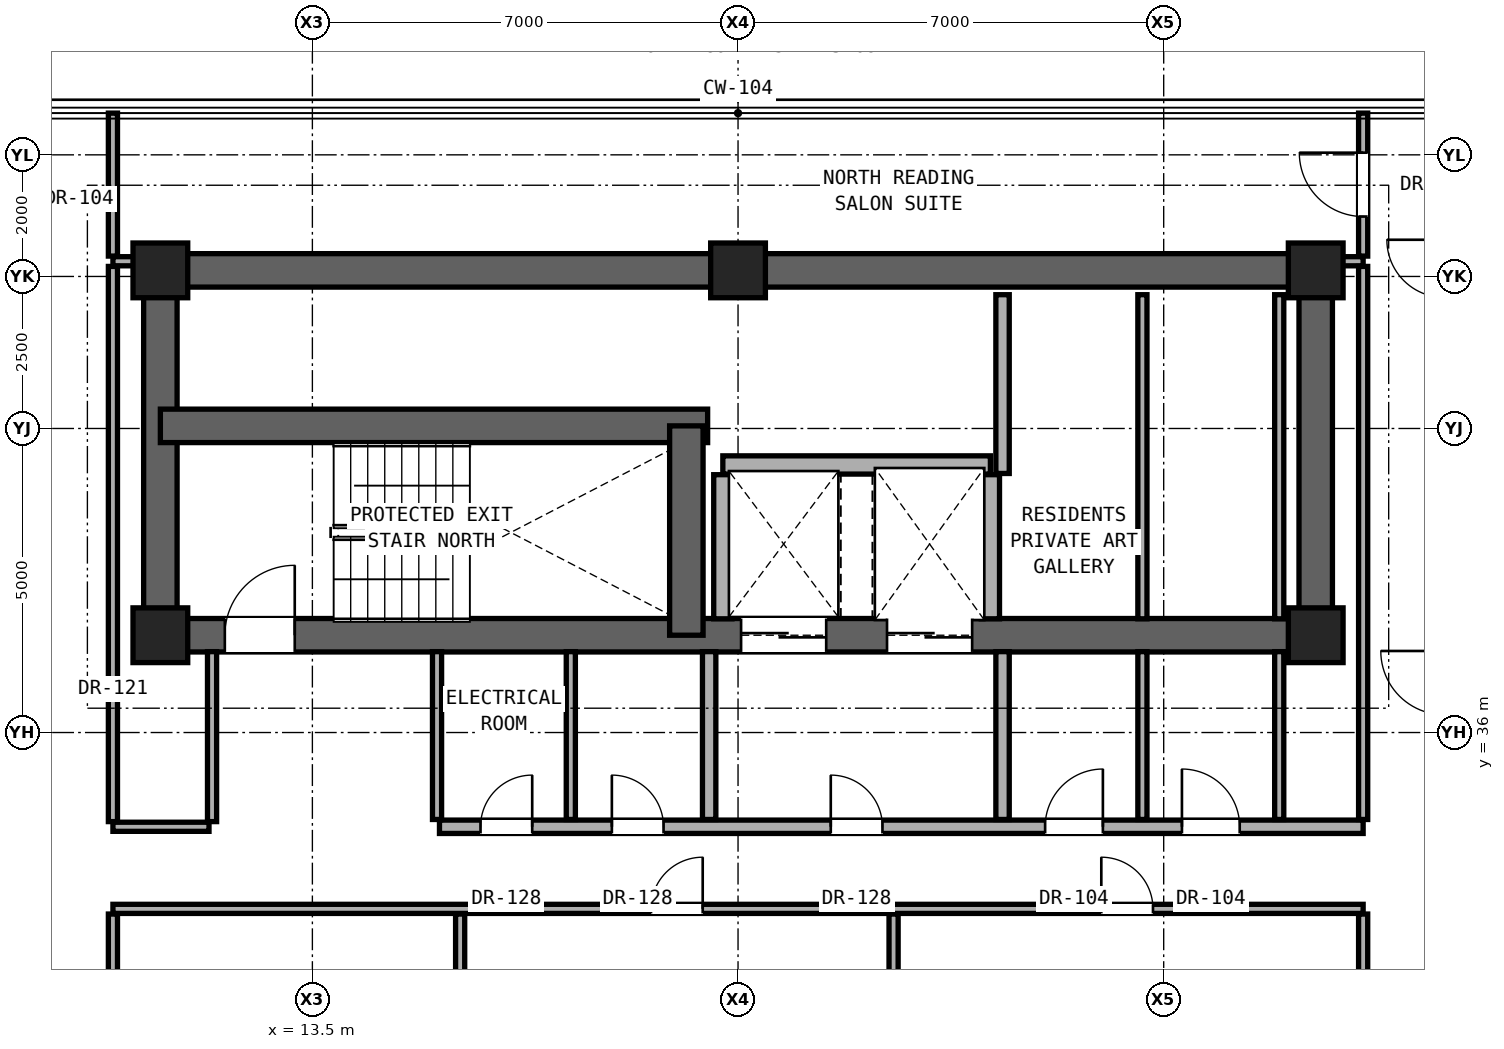
"""IFC4 building model, lengths in metres.
Left out: names, types, materials, properties, quantities, classifications, styles, units other than length and angle.
Written with IfcOpenShell. Run it as: python <this file> out.ifc"""

import sys

from ifc_helpers import new_model, si_unit, direction, frame, frame_2d, origin, origin_2d, place, context, subcontext, project, spatial, rectangle, extrude, element, fill, save


model = new_model("IFC4")
c1 = context("Model", 3, precision=1e-05, world=origin(), true_north=direction((0.0, 1.0)))
c2 = subcontext(c1, "Body", "Model", "MODEL_VIEW")
j1 = project(units=[si_unit("LENGTHUNIT", "METRE"), si_unit("PLANEANGLEUNIT", "RADIAN")], contexts=[c1])
p1 = place(None, origin())
s1 = spatial("IfcSite", under=j1, at=p1, CompositionType="ELEMENT")
p2 = place(p1, origin())
s2 = spatial("IfcBuilding", under=s1, at=p2, CompositionType="ELEMENT")
p3 = place(p2, frame((0.0, 0.0, 190.15)))
s3 = spatial("IfcBuildingStorey", under=s2, at=p3, CompositionType="ELEMENT", Elevation=190.15)
for number, where, z_axis, x_axis in (
    (1, (11.0, 37.6, 0.0), (0.0, 0.0, 1.0), (1.0, 0.0, 0.0)),
    (2, (30.0, 37.6, 0.0), (0.0, 0.0, 1.0), (1.0, 0.0, 0.0)),
    (3, (11.0, 43.6, 0.0), (0.0, 0.0, 1.0), (1.0, 0.0, 0.0)),
    (4, (20.5, 43.6, 0.0), (0.0, 0.0, 1.0), (1.0, 0.0, 0.0)),
    (5, (30.0, 43.6, 0.0), (0.0, 0.0, 1.0), (1.0, 0.0, 0.0)),
):
    element("IfcColumn", number, at=place(p3, frame(where, z_axis=z_axis, x_axis=x_axis)), inside=s3, PredefinedType="COLUMN", context=c2, shape_type="SweptSolid", body=[
        extrude(rectangle(XDim=0.9, YDim=0.9, at=origin_2d()), origin(), (0.0, 0.0, 1.0), 3.25),
    ])
p4 = place(p3, frame((11.0, 43.6, 0.0), z_axis=(0.0, 0.0, 1.0), x_axis=(1.0, 0.0, 0.0)))
e6 = element("IfcWall", 6, at=p4, inside=s3, PredefinedType="SHEAR", context=c2, shape_type="SweptSolid", body=[
    extrude(rectangle(XDim=19.0, YDim=0.55, at=frame_2d((9.5, 0.0))), origin(), (0.0, 0.0, 1.0), 3.05),
])
for number, where, z_axis, x_axis in (
    (7, (11.0, 37.6, 0.0), (0.0, 0.0, 1.0), (0.0, 1.0, 0.0)),
    (8, (30.0, 37.6, 0.0), (0.0, 0.0, 1.0), (0.0, 1.0, 0.0)),
):
    element("IfcWall", number, at=place(p3, frame(where, z_axis=z_axis, x_axis=x_axis)), inside=s3, PredefinedType="SHEAR", context=c2, shape_type="SweptSolid", body=[
        extrude(rectangle(XDim=6.0, YDim=0.55, at=frame_2d((3.0, 0.0))), origin(), (0.0, 0.0, 1.0), 3.05),
    ])
p5 = place(p3, frame((11.0, 37.6, 0.0), z_axis=(0.0, 0.0, 1.0), x_axis=(1.0, 0.0, 0.0)))
e9 = element("IfcWall", 9, at=p5, inside=s3, PredefinedType="SHEAR", context=c2, shape_type="SweptSolid", body=[
    extrude(rectangle(XDim=19.0, YDim=0.55, at=frame_2d((9.5, 0.0))), origin(), (0.0, 0.0, 1.0), 3.05),
])
p6 = place(p5, frame((1.06, 0.0, 0.0)))
e10 = element("IfcOpeningElement", 10, at=p6, cuts=e9, PredefinedType="OPENING", context=c2, shape_type="SweptSolid", body=[
    extrude(rectangle(XDim=1.15, YDim=2.2, at=frame_2d((0.575, 1.1))), frame((0.0, 0.285, 0.0), z_axis=(0.0, -1.0, 0.0), x_axis=(1.0, 0.0, 0.0)), (0.0, 0.0, 1.0), 0.57),
])
p7 = place(p5, frame((9.55, 0.0, 0.0)))
e11 = element("IfcOpeningElement", 11, at=p7, cuts=e9, PredefinedType="OPENING", context=c2, shape_type="SweptSolid", body=[
    extrude(rectangle(XDim=1.4, YDim=2.35, at=frame_2d((0.7, 1.175))), frame((0.0, 0.285, 0.0), z_axis=(0.0, -1.0, 0.0), x_axis=(1.0, 0.0, 0.0)), (0.0, 0.0, 1.0), 0.57),
])
p8 = place(p5, frame((11.95, 0.0, 0.0)))
e12 = element("IfcOpeningElement", 12, at=p8, cuts=e9, PredefinedType="OPENING", context=c2, shape_type="SweptSolid", body=[
    extrude(rectangle(XDim=1.4, YDim=2.35, at=frame_2d((0.7, 1.175))), frame((0.0, 0.285, 0.0), z_axis=(0.0, -1.0, 0.0), x_axis=(1.0, 0.0, 0.0)), (0.0, 0.0, 1.0), 0.57),
])
p9 = place(p3, frame((11.0, 41.043, 0.0), z_axis=(0.0, 0.0, 1.0), x_axis=(1.0, 0.0, 0.0)))
e13 = element("IfcWall", 13, at=p9, inside=s3, PredefinedType="SHEAR", context=c2, shape_type="SweptSolid", body=[
    extrude(rectangle(XDim=9.0, YDim=0.55, at=frame_2d((4.5, 0.0))), origin(), (0.0, 0.0, 1.0), 3.05),
])
p10 = place(p3, frame((19.65, 37.6, 0.0), z_axis=(0.0, 0.0, 1.0), x_axis=(0.0, 1.0, 0.0)))
e14 = element("IfcWall", 14, at=p10, inside=s3, PredefinedType="SHEAR", context=c2, shape_type="SweptSolid", body=[
    extrude(rectangle(XDim=3.443, YDim=0.55, at=frame_2d((1.721, 0.0))), origin(), (0.0, 0.0, 1.0), 3.05),
])
p11 = place(p3, frame((10.22, 33.1, 0.0), z_axis=(0.0, 0.0, 1.0), x_axis=(1.0, 0.0, 0.0)))
e15 = element("IfcWall", 15, at=p11, inside=s3, PredefinedType="PARTITIONING", context=c2, shape_type="SweptSolid", body=[
    extrude(rectangle(XDim=20.56, YDim=0.15, at=frame_2d((10.28, 0.0))), origin(), (0.0, 0.0, 1.0), 2.186),
])
p12 = place(p11, frame((8.849, 0.0, 0.0)))
e16 = element("IfcOpeningElement", 16, at=p12, cuts=e15, PredefinedType="OPENING", context=c2, shape_type="SweptSolid", body=[
    extrude(rectangle(XDim=0.85, YDim=2.01, at=frame_2d((0.425, 1.005))), frame((0.0, 0.085, 0.0), z_axis=(0.0, -1.0, 0.0), x_axis=(1.0, 0.0, 0.0)), (0.0, 0.0, 1.0), 0.17),
])
p13 = place(p11, frame((16.254, 0.0, 0.0)))
e17 = element("IfcOpeningElement", 17, at=p13, cuts=e15, PredefinedType="OPENING", context=c2, shape_type="SweptSolid", body=[
    extrude(rectangle(XDim=0.85, YDim=2.01, at=frame_2d((0.425, 1.005))), frame((0.0, 0.085, 0.0), z_axis=(0.0, -1.0, 0.0), x_axis=(1.0, 0.0, 0.0)), (0.0, 0.0, 1.0), 0.17),
])
p14 = place(p3, frame((10.22, 34.45, 0.0), z_axis=(0.0, 0.0, 1.0), x_axis=(1.0, 0.0, 0.0)))
e18 = element("IfcWall", 18, at=p14, inside=s3, PredefinedType="PARTITIONING", context=c2, shape_type="SweptSolid", body=[
    extrude(rectangle(XDim=1.58, YDim=0.15, at=frame_2d((0.79, 0.0))), origin(), (0.0, 0.0, 1.0), 2.186),
])
p15 = place(p3, frame((15.59, 34.45, 0.0), z_axis=(0.0, 0.0, 1.0), x_axis=(1.0, 0.0, 0.0)))
e19 = element("IfcWall", 19, at=p15, inside=s3, PredefinedType="SOLIDWALL", context=c2, shape_type="SweptSolid", body=[
    extrude(rectangle(XDim=15.19, YDim=0.22, at=frame_2d((7.595, 0.0))), origin(), (0.0, 0.0, 1.0), 2.186),
])
p16 = place(p15, frame((6.435, 0.0, 0.0)))
e20 = element("IfcOpeningElement", 20, at=p16, cuts=e19, PredefinedType="OPENING", context=c2, shape_type="SweptSolid", body=[
    extrude(rectangle(XDim=0.85, YDim=2.01, at=frame_2d((0.425, 1.005))), frame((0.0, 0.12, 0.0), z_axis=(0.0, -1.0, 0.0), x_axis=(1.0, 0.0, 0.0)), (0.0, 0.0, 1.0), 0.24),
])
p17 = place(p15, frame((9.96, 0.0, 0.0)))
e21 = element("IfcOpeningElement", 21, at=p17, cuts=e19, PredefinedType="OPENING", context=c2, shape_type="SweptSolid", body=[
    extrude(rectangle(XDim=0.95, YDim=2.15, at=frame_2d((0.475, 1.075))), frame((0.0, 0.12, 0.0), z_axis=(0.0, -1.0, 0.0), x_axis=(1.0, 0.0, 0.0)), (0.0, 0.0, 1.0), 0.24),
])
p18 = place(p15, frame((12.21, 0.0, 0.0)))
e22 = element("IfcOpeningElement", 22, at=p18, cuts=e19, PredefinedType="OPENING", context=c2, shape_type="SweptSolid", body=[
    extrude(rectangle(XDim=0.95, YDim=2.15, at=frame_2d((0.475, 1.075))), frame((0.0, 0.12, 0.0), z_axis=(0.0, -1.0, 0.0), x_axis=(1.0, 0.0, 0.0)), (0.0, 0.0, 1.0), 0.24),
])
p19 = place(p15, frame((0.675, 0.0, 0.0)))
e23 = element("IfcOpeningElement", 23, at=p19, cuts=e19, PredefinedType="OPENING", context=c2, shape_type="SweptSolid", body=[
    extrude(rectangle(XDim=0.85, YDim=2.01, at=frame_2d((0.425, 1.005))), frame((0.0, 0.12, 0.0), z_axis=(0.0, -1.0, 0.0), x_axis=(1.0, 0.0, 0.0)), (0.0, 0.0, 1.0), 0.24),
])
p20 = place(p15, frame((2.835, 0.0, 0.0)))
e24 = element("IfcOpeningElement", 24, at=p20, cuts=e19, PredefinedType="OPENING", context=c2, shape_type="SweptSolid", body=[
    extrude(rectangle(XDim=0.85, YDim=2.01, at=frame_2d((0.425, 1.005))), frame((0.0, 0.12, 0.0), z_axis=(0.0, -1.0, 0.0), x_axis=(1.0, 0.0, 0.0)), (0.0, 0.0, 1.0), 0.24),
])
p21 = place(p3, frame((20.25, 40.4, 0.0), z_axis=(0.0, 0.0, 1.0), x_axis=(1.0, 0.0, 0.0)))
e25 = element("IfcWall", 25, at=p21, inside=s3, PredefinedType="SOLIDWALL", context=c2, shape_type="SweptSolid", body=[
    extrude(rectangle(XDim=4.4, YDim=0.3, at=frame_2d((2.2, 0.0))), origin(), (0.0, 0.0, 1.0), 3.05),
])
for number, where, z_axis, x_axis in (
    (26, (10.22, 43.75, 0.0), (0.0, 0.0, 1.0), (1.0, 0.0, 0.0)),
    (27, (30.27, 43.75, 0.0), (0.0, 0.0, 1.0), (1.0, 0.0, 0.0)),
):
    element("IfcWall", number, at=place(p3, frame(where, z_axis=z_axis, x_axis=x_axis)), inside=s3, PredefinedType="PARTITIONING", context=c2, shape_type="SweptSolid", body=[
        extrude(rectangle(XDim=0.51, YDim=0.15, at=frame_2d((0.255, 0.0))), origin(), (0.0, 0.0, 1.0), 3.05),
    ])
p22 = place(p3, frame((10.22, 22.935, 0.0), z_axis=(0.0, 0.0, 1.0), x_axis=(0.0, 1.0, 0.0)))
e28 = element("IfcWall", 28, at=p22, inside=s3, PredefinedType="PARTITIONING", context=c2, shape_type="SweptSolid", body=[
    extrude(rectangle(XDim=10.08, YDim=0.15, at=frame_2d((5.04, 0.0))), origin(), (0.0, 0.0, 1.0), 2.346),
])
p23 = place(p22, frame((4.565, 0.0, 0.0)))
e29 = element("IfcOpeningElement", 29, at=p23, cuts=e28, PredefinedType="OPENING", context=c2, shape_type="SweptSolid", body=[
    extrude(rectangle(XDim=0.95, YDim=2.15, at=frame_2d((0.475, 1.075))), frame((0.0, 0.085, 0.0), z_axis=(0.0, -1.0, 0.0), x_axis=(1.0, 0.0, 0.0)), (0.0, 0.0, 1.0), 0.17),
])
p24 = place(p3, frame((10.22, 34.535, 0.0), z_axis=(0.0, 0.0, 1.0), x_axis=(0.0, 1.0, 0.0)))
e30 = element("IfcWall", 30, at=p24, inside=s3, PredefinedType="PARTITIONING", context=c2, shape_type="SweptSolid", body=[
    extrude(rectangle(XDim=9.13, YDim=0.15, at=frame_2d((4.565, 0.0))), origin(), (0.0, 0.0, 1.0), 2.442),
])
p25 = place(p3, frame((10.22, 43.835, 0.0), z_axis=(0.0, 0.0, 1.0), x_axis=(0.0, 1.0, 0.0)))
e31 = element("IfcWall", 31, at=p25, inside=s3, PredefinedType="PARTITIONING", context=c2, shape_type="SweptSolid", body=[
    extrude(rectangle(XDim=2.351, YDim=0.15, at=frame_2d((1.176, 0.0))), origin(), (0.0, 0.0, 1.0), 3.05),
])
p26 = place(p3, frame((11.85, 34.535, 0.0), z_axis=(0.0, 0.0, 1.0), x_axis=(0.0, 1.0, 0.0)))
e32 = element("IfcWall", 32, at=p26, inside=s3, PredefinedType="PARTITIONING", context=c2, shape_type="SweptSolid", body=[
    extrude(rectangle(XDim=2.795, YDim=0.15, at=frame_2d((1.397, 0.0))), origin(), (0.0, 0.0, 1.0), 3.05),
])
p27 = place(p3, frame((15.55, 34.57, 0.0), z_axis=(0.0, 0.0, 1.0), x_axis=(0.0, 1.0, 0.0)))
e33 = element("IfcWall", 33, at=p27, inside=s3, PredefinedType="PARTITIONING", context=c2, shape_type="SweptSolid", body=[
    extrude(rectangle(XDim=2.76, YDim=0.15, at=frame_2d((1.38, 0.0))), origin(), (0.0, 0.0, 1.0), 3.05),
])
p28 = place(p3, frame((15.93, 27.641, 0.0), z_axis=(0.0, 0.0, 1.0), x_axis=(0.0, 1.0, 0.0)))
e34 = element("IfcWall", 34, at=p28, inside=s3, PredefinedType="PARTITIONING", context=c2, shape_type="SweptSolid", body=[
    extrude(rectangle(XDim=5.374, YDim=0.15, at=frame_2d((2.687, 0.0))), origin(), (0.0, 0.0, 1.0), 2.186),
])
p29 = place(p3, frame((17.75, 34.57, 0.0), z_axis=(0.0, 0.0, 1.0), x_axis=(0.0, 1.0, 0.0)))
e35 = element("IfcWall", 35, at=p29, inside=s3, PredefinedType="PARTITIONING", context=c2, shape_type="SweptSolid", body=[
    extrude(rectangle(XDim=2.76, YDim=0.15, at=frame_2d((1.38, 0.0))), origin(), (0.0, 0.0, 1.0), 3.05),
])
p30 = place(p3, frame((20.025, 34.57, 0.0), z_axis=(0.0, 0.0, 1.0), x_axis=(0.0, 1.0, 0.0)))
e36 = element("IfcWall", 36, at=p30, inside=s3, PredefinedType="SOLIDWALL", context=c2, shape_type="SweptSolid", body=[
    extrude(rectangle(XDim=2.76, YDim=0.22, at=frame_2d((1.38, 0.0))), origin(), (0.0, 0.0, 1.0), 3.05),
])
p31 = place(p3, frame((20.25, 37.87, 0.0), z_axis=(0.0, 0.0, 1.0), x_axis=(0.0, 1.0, 0.0)))
e37 = element("IfcWall", 37, at=p31, inside=s3, PredefinedType="SOLIDWALL", context=c2, shape_type="SweptSolid", body=[
    extrude(rectangle(XDim=2.37, YDim=0.3, at=frame_2d((1.185, 0.0))), origin(), (0.0, 0.0, 1.0), 3.05),
])
p32 = place(p3, frame((23.058, 27.641, 0.0), z_axis=(0.0, 0.0, 1.0), x_axis=(0.0, 1.0, 0.0)))
e38 = element("IfcWall", 38, at=p32, inside=s3, PredefinedType="PARTITIONING", context=c2, shape_type="SweptSolid", body=[
    extrude(rectangle(XDim=5.374, YDim=0.15, at=frame_2d((2.687, 0.0))), origin(), (0.0, 0.0, 1.0), 2.186),
])
p33 = place(p3, frame((24.65, 37.87, 0.0), z_axis=(0.0, 0.0, 1.0), x_axis=(0.0, 1.0, 0.0)))
e39 = element("IfcWall", 39, at=p33, inside=s3, PredefinedType="SOLIDWALL", context=c2, shape_type="SweptSolid", body=[
    extrude(rectangle(XDim=2.37, YDim=0.3, at=frame_2d((1.185, 0.0))), origin(), (0.0, 0.0, 1.0), 3.05),
])
p34 = place(p3, frame((24.85, 34.57, 0.0), z_axis=(0.0, 0.0, 1.0), x_axis=(0.0, 1.0, 0.0)))
e40 = element("IfcWall", 40, at=p34, inside=s3, PredefinedType="SOLIDWALL", context=c2, shape_type="SweptSolid", body=[
    extrude(rectangle(XDim=2.76, YDim=0.22, at=frame_2d((1.38, 0.0))), origin(), (0.0, 0.0, 1.0), 3.05),
])
p35 = place(p3, frame((24.85, 40.26, 0.0), z_axis=(0.0, 0.0, 1.0), x_axis=(0.0, 1.0, 0.0)))
e41 = element("IfcWall", 41, at=p35, inside=s3, PredefinedType="SOLIDWALL", context=c2, shape_type="SweptSolid", body=[
    extrude(rectangle(XDim=2.94, YDim=0.22, at=frame_2d((1.47, 0.0))), origin(), (0.0, 0.0, 1.0), 3.05),
])
p36 = place(p3, frame((27.15, 34.57, 0.0), z_axis=(0.0, 0.0, 1.0), x_axis=(0.0, 1.0, 0.0)))
e42 = element("IfcWall", 42, at=p36, inside=s3, PredefinedType="PARTITIONING", context=c2, shape_type="SweptSolid", body=[
    extrude(rectangle(XDim=2.76, YDim=0.15, at=frame_2d((1.38, 0.0))), origin(), (0.0, 0.0, 1.0), 3.05),
])
p37 = place(p3, frame((27.15, 37.87, 0.0), z_axis=(0.0, 0.0, 1.0), x_axis=(0.0, 1.0, 0.0)))
e43 = element("IfcWall", 43, at=p37, inside=s3, PredefinedType="PARTITIONING", context=c2, shape_type="SweptSolid", body=[
    extrude(rectangle(XDim=5.33, YDim=0.15, at=frame_2d((2.665, 0.0))), origin(), (0.0, 0.0, 1.0), 3.05),
])
p38 = place(p3, frame((29.4, 34.57, 0.0), z_axis=(0.0, 0.0, 1.0), x_axis=(0.0, 1.0, 0.0)))
e44 = element("IfcWall", 44, at=p38, inside=s3, PredefinedType="PARTITIONING", context=c2, shape_type="SweptSolid", body=[
    extrude(rectangle(XDim=2.76, YDim=0.15, at=frame_2d((1.38, 0.0))), origin(), (0.0, 0.0, 1.0), 3.05),
])
p39 = place(p3, frame((29.4, 37.87, 0.0), z_axis=(0.0, 0.0, 1.0), x_axis=(0.0, 1.0, 0.0)))
e45 = element("IfcWall", 45, at=p39, inside=s3, PredefinedType="PARTITIONING", context=c2, shape_type="SweptSolid", body=[
    extrude(rectangle(XDim=5.33, YDim=0.15, at=frame_2d((2.665, 0.0))), origin(), (0.0, 0.0, 1.0), 3.05),
])
p40 = place(p3, frame((30.78, 27.641, 0.0), z_axis=(0.0, 0.0, 1.0), x_axis=(0.0, 1.0, 0.0)))
e46 = element("IfcWall", 46, at=p40, inside=s3, PredefinedType="PARTITIONING", context=c2, shape_type="SweptSolid", body=[
    extrude(rectangle(XDim=5.374, YDim=0.15, at=frame_2d((2.687, 0.0))), origin(), (0.0, 0.0, 1.0), 2.346),
])
p41 = place(p3, frame((30.78, 34.57, 0.0), z_axis=(0.0, 0.0, 1.0), x_axis=(0.0, 1.0, 0.0)))
e47 = element("IfcWall", 47, at=p41, inside=s3, PredefinedType="PARTITIONING", context=c2, shape_type="SweptSolid", body=[
    extrude(rectangle(XDim=9.095, YDim=0.15, at=frame_2d((4.547, 0.0))), origin(), (0.0, 0.0, 1.0), 2.442),
])
p42 = place(p3, frame((30.78, 43.835, 0.0), z_axis=(0.0, 0.0, 1.0), x_axis=(0.0, 1.0, 0.0)))
e48 = element("IfcWall", 48, at=p42, inside=s3, PredefinedType="PARTITIONING", context=c2, shape_type="SweptSolid", body=[
    extrude(rectangle(XDim=2.351, YDim=0.15, at=frame_2d((1.176, 0.0))), origin(), (0.0, 0.0, 1.0), 3.05),
])
p43 = place(p42, frame((0.65, 0.0, 0.0)))
e49 = element("IfcOpeningElement", 49, at=p43, cuts=e48, PredefinedType="OPENING", context=c2, shape_type="SweptSolid", body=[
    extrude(rectangle(XDim=1.05, YDim=2.2, at=frame_2d((0.525, 1.1))), frame((0.0, 0.085, 0.0), z_axis=(0.0, -1.0, 0.0), x_axis=(1.0, 0.0, 0.0)), (0.0, 0.0, 1.0), 0.17),
])
p44 = place(p6, origin())
e50 = element("IfcDoor", 50, at=p44, inside=s3, OperationType="SINGLE_SWING_RIGHT", PredefinedType="DOOR", context=c2, shape_type="SweptSolid", body=[
    extrude(rectangle(XDim=1.15, YDim=2.2, at=frame_2d((0.575, 1.1))), frame((0.0, 0.025, 0.0), z_axis=(0.0, -1.0, 0.0), x_axis=(1.0, 0.0, 0.0)), (0.0, 0.0, 1.0), 0.05),
])
fill(e10, e50)
p45 = place(p16, origin())
e51 = element("IfcDoor", 51, at=p45, inside=s3, OperationType="SINGLE_SWING_LEFT", PredefinedType="DOOR", context=c2, shape_type="SweptSolid", body=[
    extrude(rectangle(XDim=0.85, YDim=2.01, at=frame_2d((0.425, 1.005))), frame((0.0, 0.025, 0.0), z_axis=(0.0, -1.0, 0.0), x_axis=(1.0, 0.0, 0.0)), (0.0, 0.0, 1.0), 0.05),
])
fill(e20, e51)
p46 = place(p17, origin())
e52 = element("IfcDoor", 52, at=p46, inside=s3, OperationType="SINGLE_SWING_RIGHT", PredefinedType="DOOR", context=c2, shape_type="SweptSolid", body=[
    extrude(rectangle(XDim=0.95, YDim=2.15, at=frame_2d((0.475, 1.075))), frame((0.0, 0.025, 0.0), z_axis=(0.0, -1.0, 0.0), x_axis=(1.0, 0.0, 0.0)), (0.0, 0.0, 1.0), 0.05),
])
fill(e21, e52)
p47 = place(p18, origin())
e53 = element("IfcDoor", 53, at=p47, inside=s3, OperationType="SINGLE_SWING_LEFT", PredefinedType="DOOR", context=c2, shape_type="SweptSolid", body=[
    extrude(rectangle(XDim=0.95, YDim=2.15, at=frame_2d((0.475, 1.075))), frame((0.0, 0.025, 0.0), z_axis=(0.0, -1.0, 0.0), x_axis=(1.0, 0.0, 0.0)), (0.0, 0.0, 1.0), 0.05),
])
fill(e22, e53)
p48 = place(p19, origin())
e54 = element("IfcDoor", 54, at=p48, inside=s3, OperationType="SINGLE_SWING_RIGHT", PredefinedType="DOOR", context=c2, shape_type="SweptSolid", body=[
    extrude(rectangle(XDim=0.85, YDim=2.01, at=frame_2d((0.425, 1.005))), frame((0.0, 0.025, 0.0), z_axis=(0.0, -1.0, 0.0), x_axis=(1.0, 0.0, 0.0)), (0.0, 0.0, 1.0), 0.05),
])
fill(e23, e54)
p49 = place(p20, origin())
e55 = element("IfcDoor", 55, at=p49, inside=s3, OperationType="SINGLE_SWING_LEFT", PredefinedType="DOOR", context=c2, shape_type="SweptSolid", body=[
    extrude(rectangle(XDim=0.85, YDim=2.01, at=frame_2d((0.425, 1.005))), frame((0.0, 0.025, 0.0), z_axis=(0.0, -1.0, 0.0), x_axis=(1.0, 0.0, 0.0)), (0.0, 0.0, 1.0), 0.05),
])
fill(e24, e55)
p50 = place(p12, origin())
e56 = element("IfcDoor", 56, at=p50, inside=s3, OperationType="SINGLE_SWING_RIGHT", PredefinedType="DOOR", context=c2, shape_type="SweptSolid", body=[
    extrude(rectangle(XDim=0.85, YDim=2.01, at=frame_2d((0.425, 1.005))), frame((0.0, 0.025, 0.0), z_axis=(0.0, -1.0, 0.0), x_axis=(1.0, 0.0, 0.0)), (0.0, 0.0, 1.0), 0.05),
])
fill(e16, e56)
p51 = place(p13, origin())
e57 = element("IfcDoor", 57, at=p51, inside=s3, OperationType="SINGLE_SWING_LEFT", PredefinedType="DOOR", context=c2, shape_type="SweptSolid", body=[
    extrude(rectangle(XDim=0.85, YDim=2.01, at=frame_2d((0.425, 1.005))), frame((0.0, 0.025, 0.0), z_axis=(0.0, -1.0, 0.0), x_axis=(1.0, 0.0, 0.0)), (0.0, 0.0, 1.0), 0.05),
])
fill(e17, e57)
p52 = place(p43, origin())
e58 = element("IfcDoor", 58, at=p52, inside=s3, OperationType="SINGLE_SWING_RIGHT", PredefinedType="DOOR", context=c2, shape_type="SweptSolid", body=[
    extrude(rectangle(XDim=1.05, YDim=2.2, at=frame_2d((0.525, 1.1))), frame((0.0, 0.025, 0.0), z_axis=(0.0, -1.0, 0.0), x_axis=(1.0, 0.0, 0.0)), (0.0, 0.0, 1.0), 0.05),
])
fill(e49, e58)
p53 = place(p7, origin())
e59 = element("IfcDoor", 59, at=p53, inside=s3, OperationType="DOUBLE_DOOR_SLIDING", PredefinedType="DOOR", context=c2, shape_type="SweptSolid", body=[
    extrude(rectangle(XDim=1.4, YDim=2.35, at=frame_2d((0.7, 1.175))), frame((0.0, 0.025, 0.0), z_axis=(0.0, -1.0, 0.0), x_axis=(1.0, 0.0, 0.0)), (0.0, 0.0, 1.0), 0.05),
])
fill(e11, e59)
p54 = place(p8, origin())
e60 = element("IfcDoor", 60, at=p54, inside=s3, OperationType="DOUBLE_DOOR_SLIDING", PredefinedType="DOOR", context=c2, shape_type="SweptSolid", body=[
    extrude(rectangle(XDim=1.4, YDim=2.35, at=frame_2d((0.7, 1.175))), frame((0.0, 0.025, 0.0), z_axis=(0.0, -1.0, 0.0), x_axis=(1.0, 0.0, 0.0)), (0.0, 0.0, 1.0), 0.05),
])
fill(e12, e60)
save(model, sys.argv[1])
